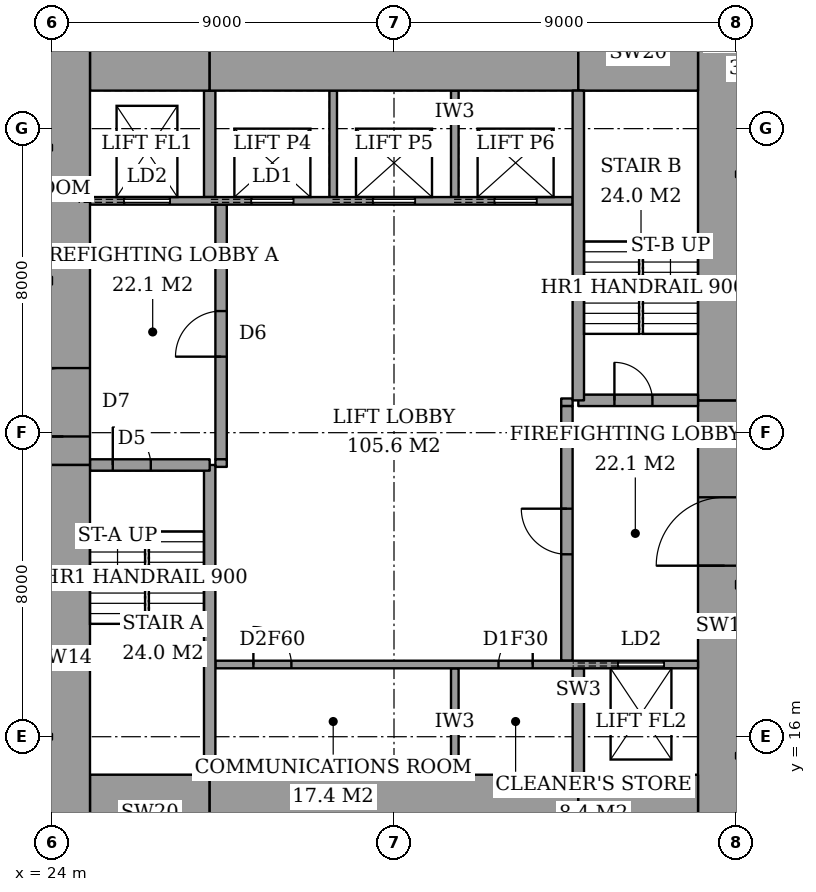
"""IFC4 building model, lengths in metres.
Left out: names, types, materials, properties, quantities, classifications, styles, units other than length and angle.
Written with IfcOpenShell. Run it as: python <this file> out.ifc"""

import sys

from ifc_helpers import new_model, si_unit, direction, frame, frame_2d, origin, place, context, subcontext, project, spatial, rectangle, extrude, element, fill, save


model = new_model("IFC4")
c1 = context("Model", 3, precision=1e-05, world=origin(), true_north=direction((0.0, 1.0)))
c2 = subcontext(c1, "Body", "Model", "MODEL_VIEW")
j1 = project(units=[si_unit("LENGTHUNIT", "METRE"), si_unit("PLANEANGLEUNIT", "RADIAN")], contexts=[c1])
p1 = place(None, origin())
s1 = spatial("IfcSite", under=j1, at=p1, CompositionType="ELEMENT")
p2 = place(p1, origin())
s2 = spatial("IfcBuilding", under=s1, at=p2, CompositionType="ELEMENT")
p3 = place(p2, frame((0.0, 0.0, 203.8)))
s3 = spatial("IfcBuildingStorey", under=s2, at=p3, CompositionType="ELEMENT", Elevation=203.8)
p4 = place(p3, frame((25.0, 14.0, 0.0), z_axis=(0.0, 0.0, 1.0), x_axis=(1.0, 0.0, 0.0)))
e1 = element("IfcWall", 1, at=p4, inside=s3, PredefinedType="SHEAR", context=c2, shape_type="SweptSolid", body=[
    extrude(rectangle(XDim=3.15, YDim=2.0, at=frame_2d((1.575, 0.0))), origin(), (0.0, 0.0, 1.0), 3.6),
])
p5 = place(p3, frame((28.15, 14.0, 0.0), z_axis=(0.0, 0.0, 1.0), x_axis=(1.0, 0.0, 0.0)))
e2 = element("IfcWall", 2, at=p5, inside=s3, PredefinedType="SHEAR", context=c2, shape_type="SweptSolid", body=[
    extrude(rectangle(XDim=9.7, YDim=2.0, at=frame_2d((4.85, 0.0))), origin(), (0.0, 0.0, 1.0), 3.6),
])
for number, where, z_axis, x_axis in (
    (3, (37.85, 14.0, 0.0), (0.0, 0.0, 1.0), (1.0, 0.0, 0.0)),
    (4, (25.0, 34.0, 0.0), (0.0, 0.0, 1.0), (1.0, 0.0, 0.0)),
):
    element("IfcWall", number, at=place(p3, frame(where, z_axis=z_axis, x_axis=x_axis)), inside=s3, PredefinedType="SHEAR", context=c2, shape_type="SweptSolid", body=[
        extrude(rectangle(XDim=3.15, YDim=2.0, at=frame_2d((1.575, 0.0))), origin(), (0.0, 0.0, 1.0), 3.6),
    ])
p6 = place(p3, frame((28.15, 34.0, 0.0), z_axis=(0.0, 0.0, 1.0), x_axis=(1.0, 0.0, 0.0)))
e5 = element("IfcWall", 5, at=p6, inside=s3, PredefinedType="SHEAR", context=c2, shape_type="SweptSolid", body=[
    extrude(rectangle(XDim=9.7, YDim=2.0, at=frame_2d((4.85, 0.0))), origin(), (0.0, 0.0, 1.0), 3.6),
])
p7 = place(p3, frame((37.85, 34.0, 0.0), z_axis=(0.0, 0.0, 1.0), x_axis=(1.0, 0.0, 0.0)))
e6 = element("IfcWall", 6, at=p7, inside=s3, PredefinedType="SHEAR", context=c2, shape_type="SweptSolid", body=[
    extrude(rectangle(XDim=3.15, YDim=2.0, at=frame_2d((1.575, 0.0))), origin(), (0.0, 0.0, 1.0), 3.6),
])
p8 = place(p3, frame((24.3, 13.0, 0.0), z_axis=(0.0, 0.0, 1.0), x_axis=(0.0, 1.0, 0.0)))
e7 = element("IfcWall", 7, at=p8, inside=s3, PredefinedType="SHEAR", context=c2, shape_type="SweptSolid", body=[
    extrude(rectangle(XDim=10.15, YDim=1.4, at=frame_2d((5.075, 0.0))), origin(), (0.0, 0.0, 1.0), 3.6),
])
p9 = place(p3, frame((24.3, 23.15, 0.0), z_axis=(0.0, 0.0, 1.0), x_axis=(0.0, 1.0, 0.0)))
e8 = element("IfcWall", 8, at=p9, inside=s3, PredefinedType="SHEAR", context=c2, shape_type="SweptSolid", body=[
    extrude(rectangle(XDim=11.85, YDim=1.4, at=frame_2d((5.925, 0.0))), origin(), (0.0, 0.0, 1.0), 3.6),
])
p10 = place(p9, frame((0.75, 0.0, 0.0)))
e9 = element("IfcOpeningElement", 9, at=p10, cuts=e8, PredefinedType="OPENING", context=c2, shape_type="SweptSolid", body=[
    extrude(rectangle(XDim=1.8, YDim=2.4, at=frame_2d((0.9, 1.2))), frame((0.0, 0.71, 0.0), z_axis=(0.0, -1.0, 0.0), x_axis=(1.0, 0.0, 0.0)), (0.0, 0.0, 1.0), 1.42),
])
p11 = place(p3, frame((41.7, 13.0, 0.0), z_axis=(0.0, 0.0, 1.0), x_axis=(0.0, 1.0, 0.0)))
e10 = element("IfcWall", 10, at=p11, inside=s3, PredefinedType="SHEAR", context=c2, shape_type="SweptSolid", body=[
    extrude(rectangle(XDim=11.85, YDim=1.4, at=frame_2d((5.925, 0.0))), origin(), (0.0, 0.0, 1.0), 3.6),
])
p12 = place(p11, frame((7.5, 0.0, 0.0)))
e11 = element("IfcOpeningElement", 11, at=p12, cuts=e10, PredefinedType="OPENING", context=c2, shape_type="SweptSolid", body=[
    extrude(rectangle(XDim=1.8, YDim=2.4, at=frame_2d((0.9, 1.2))), frame((0.0, 0.71, 0.0), z_axis=(0.0, -1.0, 0.0), x_axis=(1.0, 0.0, 0.0)), (0.0, 0.0, 1.0), 1.42),
])
p13 = place(p3, frame((41.7, 24.85, 0.0), z_axis=(0.0, 0.0, 1.0), x_axis=(0.0, 1.0, 0.0)))
e12 = element("IfcWall", 12, at=p13, inside=s3, PredefinedType="SHEAR", context=c2, shape_type="SweptSolid", body=[
    extrude(rectangle(XDim=10.15, YDim=1.4, at=frame_2d((5.075, 0.0))), origin(), (0.0, 0.0, 1.0), 3.6),
])
p14 = place(p3, frame((28.15, 15.0, 0.0), z_axis=(0.0, 0.0, 1.0), x_axis=(0.0, 1.0, 0.0)))
e13 = element("IfcWall", 13, at=p14, inside=s3, PredefinedType="SHEAR", context=c2, shape_type="SweptSolid", body=[
    extrude(rectangle(XDim=8.15, YDim=0.3, at=frame_2d((4.075, 0.0))), origin(), (0.0, 0.0, 1.0), 3.6),
])
p15 = place(p3, frame((25.0, 23.15, 0.0), z_axis=(0.0, 0.0, 1.0), x_axis=(1.0, 0.0, 0.0)))
e14 = element("IfcWall", 14, at=p15, inside=s3, PredefinedType="SHEAR", context=c2, shape_type="SweptSolid", body=[
    extrude(rectangle(XDim=3.15, YDim=0.3, at=frame_2d((1.575, 0.0))), origin(), (0.0, 0.0, 1.0), 3.6),
])
p16 = place(p15, frame((0.6, 0.0, 0.0)))
e15 = element("IfcOpeningElement", 15, at=p16, cuts=e14, PredefinedType="OPENING", context=c2, shape_type="SweptSolid", body=[
    extrude(rectangle(XDim=1.0, YDim=2.1, at=frame_2d((0.5, 1.05))), frame((0.0, 0.16, 0.0), z_axis=(0.0, -1.0, 0.0), x_axis=(1.0, 0.0, 0.0)), (0.0, 0.0, 1.0), 0.32),
])
p17 = place(p3, frame((37.85, 24.85, 0.0), z_axis=(0.0, 0.0, 1.0), x_axis=(0.0, 1.0, 0.0)))
e16 = element("IfcWall", 16, at=p17, inside=s3, PredefinedType="SHEAR", context=c2, shape_type="SweptSolid", body=[
    extrude(rectangle(XDim=8.15, YDim=0.3, at=frame_2d((4.075, 0.0))), origin(), (0.0, 0.0, 1.0), 3.6),
])
p18 = place(p3, frame((37.85, 24.85, 0.0), z_axis=(0.0, 0.0, 1.0), x_axis=(1.0, 0.0, 0.0)))
e17 = element("IfcWall", 17, at=p18, inside=s3, PredefinedType="SHEAR", context=c2, shape_type="SweptSolid", body=[
    extrude(rectangle(XDim=3.15, YDim=0.3, at=frame_2d((1.575, 0.0))), origin(), (0.0, 0.0, 1.0), 3.6),
])
p19 = place(p18, frame((0.95, 0.0, 0.0)))
e18 = element("IfcOpeningElement", 18, at=p19, cuts=e17, PredefinedType="OPENING", context=c2, shape_type="SweptSolid", body=[
    extrude(rectangle(XDim=1.0, YDim=2.1, at=frame_2d((0.5, 1.05))), frame((0.0, 0.16, 0.0), z_axis=(0.0, -1.0, 0.0), x_axis=(1.0, 0.0, 0.0)), (0.0, 0.0, 1.0), 0.32),
])
p20 = place(p3, frame((28.45, 23.3, 0.0), z_axis=(0.0, 0.0, 1.0), x_axis=(0.0, 1.0, 0.0)))
e19 = element("IfcWall", 19, at=p20, inside=s3, PredefinedType="PARTITIONING", context=c2, shape_type="SweptSolid", body=[
    extrude(rectangle(XDim=6.7, YDim=0.3, at=frame_2d((3.35, 0.0))), origin(), (0.0, 0.0, 1.0), 3.6),
])
p21 = place(p20, frame((2.7, 0.0, 0.0)))
e20 = element("IfcOpeningElement", 20, at=p21, cuts=e19, PredefinedType="OPENING", context=c2, shape_type="SweptSolid", body=[
    extrude(rectangle(XDim=1.2, YDim=2.1, at=frame_2d((0.6, 1.05))), frame((0.0, 0.16, 0.0), z_axis=(0.0, -1.0, 0.0), x_axis=(1.0, 0.0, 0.0)), (0.0, 0.0, 1.0), 0.32),
])
p22 = place(p3, frame((37.55, 18.0, 0.0), z_axis=(0.0, 0.0, 1.0), x_axis=(0.0, 1.0, 0.0)))
e21 = element("IfcWall", 21, at=p22, inside=s3, PredefinedType="PARTITIONING", context=c2, shape_type="SweptSolid", body=[
    extrude(rectangle(XDim=6.7, YDim=0.3, at=frame_2d((3.35, 0.0))), origin(), (0.0, 0.0, 1.0), 3.6),
])
p23 = place(p22, frame((2.8, 0.0, 0.0)))
e22 = element("IfcOpeningElement", 22, at=p23, cuts=e21, PredefinedType="OPENING", context=c2, shape_type="SweptSolid", body=[
    extrude(rectangle(XDim=1.2, YDim=2.1, at=frame_2d((0.6, 1.05))), frame((0.0, 0.16, 0.0), z_axis=(0.0, -1.0, 0.0), x_axis=(1.0, 0.0, 0.0)), (0.0, 0.0, 1.0), 0.32),
])
p24 = place(p3, frame((28.3, 17.9, 0.0), z_axis=(0.0, 0.0, 1.0), x_axis=(1.0, 0.0, 0.0)))
e23 = element("IfcWall", 23, at=p24, inside=s3, PredefinedType="PARTITIONING", context=c2, shape_type="SweptSolid", body=[
    extrude(rectangle(XDim=12.7, YDim=0.2, at=frame_2d((6.35, 0.0))), origin(), (0.0, 0.0, 1.0), 3.6),
])
p25 = place(p24, frame((1.0, 0.0, 0.0)))
e24 = element("IfcOpeningElement", 24, at=p25, cuts=e23, PredefinedType="OPENING", context=c2, shape_type="SweptSolid", body=[
    extrude(rectangle(XDim=1.0, YDim=2.1, at=frame_2d((0.5, 1.05))), frame((0.0, 0.11, 0.0), z_axis=(0.0, -1.0, 0.0), x_axis=(1.0, 0.0, 0.0)), (0.0, 0.0, 1.0), 0.22),
])
p26 = place(p24, frame((7.45, 0.0, 0.0)))
e25 = element("IfcOpeningElement", 25, at=p26, cuts=e23, PredefinedType="OPENING", context=c2, shape_type="SweptSolid", body=[
    extrude(rectangle(XDim=0.9, YDim=2.1, at=frame_2d((0.45, 1.05))), frame((0.0, 0.11, 0.0), z_axis=(0.0, -1.0, 0.0), x_axis=(1.0, 0.0, 0.0)), (0.0, 0.0, 1.0), 0.22),
])
p27 = place(p24, frame((10.6, 0.0, 0.0)))
e26 = element("IfcOpeningElement", 26, at=p27, cuts=e23, PredefinedType="OPENING", context=c2, shape_type="SweptSolid", body=[
    extrude(rectangle(XDim=1.2, YDim=2.1, at=frame_2d((0.6, 1.05))), frame((0.0, 0.11, 0.0), z_axis=(0.0, -1.0, 0.0), x_axis=(1.0, 0.0, 0.0)), (0.0, 0.0, 1.0), 0.22),
])
p28 = place(p3, frame((25.0, 30.1, 0.0), z_axis=(0.0, 0.0, 1.0), x_axis=(1.0, 0.0, 0.0)))
e27 = element("IfcWall", 27, at=p28, inside=s3, PredefinedType="PARTITIONING", context=c2, shape_type="SweptSolid", body=[
    extrude(rectangle(XDim=12.7, YDim=0.2, at=frame_2d((6.35, 0.0))), origin(), (0.0, 0.0, 1.0), 3.6),
])
p29 = place(p28, frame((4.25, 0.0, 0.0)))
e28 = element("IfcOpeningElement", 28, at=p29, cuts=e27, PredefinedType="OPENING", context=c2, shape_type="SweptSolid", body=[
    extrude(rectangle(XDim=1.1, YDim=2.1, at=frame_2d((0.55, 1.05))), frame((0.0, 0.11, 0.0), z_axis=(0.0, -1.0, 0.0), x_axis=(1.0, 0.0, 0.0)), (0.0, 0.0, 1.0), 0.22),
])
p30 = place(p28, frame((7.45, 0.0, 0.0)))
e29 = element("IfcOpeningElement", 29, at=p30, cuts=e27, PredefinedType="OPENING", context=c2, shape_type="SweptSolid", body=[
    extrude(rectangle(XDim=1.1, YDim=2.1, at=frame_2d((0.55, 1.05))), frame((0.0, 0.11, 0.0), z_axis=(0.0, -1.0, 0.0), x_axis=(1.0, 0.0, 0.0)), (0.0, 0.0, 1.0), 0.22),
])
p31 = place(p28, frame((10.65, 0.0, 0.0)))
e30 = element("IfcOpeningElement", 30, at=p31, cuts=e27, PredefinedType="OPENING", context=c2, shape_type="SweptSolid", body=[
    extrude(rectangle(XDim=1.1, YDim=2.1, at=frame_2d((0.55, 1.05))), frame((0.0, 0.11, 0.0), z_axis=(0.0, -1.0, 0.0), x_axis=(1.0, 0.0, 0.0)), (0.0, 0.0, 1.0), 0.22),
])
p32 = place(p28, frame((0.9, 0.0, 0.0)))
e31 = element("IfcOpeningElement", 31, at=p32, cuts=e27, PredefinedType="OPENING", context=c2, shape_type="SweptSolid", body=[
    extrude(rectangle(XDim=1.2, YDim=2.1, at=frame_2d((0.6, 1.05))), frame((0.0, 0.11, 0.0), z_axis=(0.0, -1.0, 0.0), x_axis=(1.0, 0.0, 0.0)), (0.0, 0.0, 1.0), 0.22),
])
p33 = place(p3, frame((34.6, 15.0, 0.0), z_axis=(0.0, 0.0, 1.0), x_axis=(0.0, 1.0, 0.0)))
e32 = element("IfcWall", 32, at=p33, inside=s3, PredefinedType="PARTITIONING", context=c2, shape_type="SweptSolid", body=[
    extrude(rectangle(XDim=2.8, YDim=0.2, at=frame_2d((1.4, 0.0))), origin(), (0.0, 0.0, 1.0), 3.6),
])
p34 = place(p3, frame((37.85, 15.0, 0.0), z_axis=(0.0, 0.0, 1.0), x_axis=(0.0, 1.0, 0.0)))
e33 = element("IfcWall", 33, at=p34, inside=s3, PredefinedType="SHEAR", context=c2, shape_type="SweptSolid", body=[
    extrude(rectangle(XDim=2.8, YDim=0.3, at=frame_2d((1.4, 0.0))), origin(), (0.0, 0.0, 1.0), 3.6),
])
for number, where, z_axis, x_axis in (
    (34, (31.4, 30.2, 0.0), (0.0, 0.0, 1.0), (0.0, 1.0, 0.0)),
    (35, (34.6, 30.2, 0.0), (0.0, 0.0, 1.0), (0.0, 1.0, 0.0)),
):
    element("IfcWall", number, at=place(p3, frame(where, z_axis=z_axis, x_axis=x_axis)), inside=s3, PredefinedType="PARTITIONING", context=c2, shape_type="SweptSolid", body=[
        extrude(rectangle(XDim=2.8, YDim=0.2, at=frame_2d((1.4, 0.0))), origin(), (0.0, 0.0, 1.0), 3.6),
    ])
p35 = place(p3, frame((28.15, 30.2, 0.0), z_axis=(0.0, 0.0, 1.0), x_axis=(0.0, 1.0, 0.0)))
e36 = element("IfcWall", 36, at=p35, inside=s3, PredefinedType="SHEAR", context=c2, shape_type="SweptSolid", body=[
    extrude(rectangle(XDim=2.8, YDim=0.3, at=frame_2d((1.4, 0.0))), origin(), (0.0, 0.0, 1.0), 3.6),
])
for number, where, z_axis, x_axis in (
    (37, (28.3, 23.2, 0.0), (0.0, 0.0, 1.0), (1.0, 0.0, 0.0)),
    (38, (37.4, 24.8, 0.0), (0.0, 0.0, 1.0), (1.0, 0.0, 0.0)),
):
    element("IfcWall", number, at=place(p3, frame(where, z_axis=z_axis, x_axis=x_axis)), inside=s3, PredefinedType="PARTITIONING", context=c2, shape_type="SweptSolid", body=[
        extrude(rectangle(XDim=0.3, YDim=0.2, at=frame_2d((0.15, 0.0))), origin(), (0.0, 0.0, 1.0), 3.6),
    ])
p36 = place(p16, origin())
e39 = element("IfcDoor", 39, at=p36, inside=s3, OperationType="SINGLE_SWING_RIGHT", PredefinedType="DOOR", context=c2, shape_type="SweptSolid", body=[
    extrude(rectangle(XDim=1.0, YDim=2.1, at=frame_2d((0.5, 1.05))), frame((0.0, 0.025, 0.0), z_axis=(0.0, -1.0, 0.0), x_axis=(1.0, 0.0, 0.0)), (0.0, 0.0, 1.0), 0.05),
])
fill(e15, e39)
p37 = place(p19, origin())
e40 = element("IfcDoor", 40, at=p37, inside=s3, OperationType="SINGLE_SWING_RIGHT", PredefinedType="DOOR", context=c2, shape_type="SweptSolid", body=[
    extrude(rectangle(XDim=1.0, YDim=2.1, at=frame_2d((0.5, 1.05))), frame((0.0, 0.025, 0.0), z_axis=(0.0, -1.0, 0.0), x_axis=(1.0, 0.0, 0.0)), (0.0, 0.0, 1.0), 0.05),
])
fill(e18, e40)
p38 = place(p21, origin())
e41 = element("IfcDoor", 41, at=p38, inside=s3, OperationType="SINGLE_SWING_RIGHT", PredefinedType="DOOR", context=c2, shape_type="SweptSolid", body=[
    extrude(rectangle(XDim=1.2, YDim=2.1, at=frame_2d((0.6, 1.05))), frame((0.0, 0.025, 0.0), z_axis=(0.0, -1.0, 0.0), x_axis=(1.0, 0.0, 0.0)), (0.0, 0.0, 1.0), 0.05),
])
fill(e20, e41)
p39 = place(p23, origin())
e42 = element("IfcDoor", 42, at=p39, inside=s3, OperationType="SINGLE_SWING_LEFT", PredefinedType="DOOR", context=c2, shape_type="SweptSolid", body=[
    extrude(rectangle(XDim=1.2, YDim=2.1, at=frame_2d((0.6, 1.05))), frame((0.0, 0.025, 0.0), z_axis=(0.0, -1.0, 0.0), x_axis=(1.0, 0.0, 0.0)), (0.0, 0.0, 1.0), 0.05),
])
fill(e22, e42)
p40 = place(p10, origin())
e43 = element("IfcDoor", 43, at=p40, inside=s3, OperationType="DOUBLE_DOOR_DOUBLE_SWING", PredefinedType="DOOR", context=c2, shape_type="SweptSolid", body=[
    extrude(rectangle(XDim=1.8, YDim=2.4, at=frame_2d((0.9, 1.2))), frame((0.0, 0.025, 0.0), z_axis=(0.0, -1.0, 0.0), x_axis=(1.0, 0.0, 0.0)), (0.0, 0.0, 1.0), 0.05),
])
fill(e9, e43)
p41 = place(p12, origin())
e44 = element("IfcDoor", 44, at=p41, inside=s3, OperationType="DOUBLE_DOOR_DOUBLE_SWING", PredefinedType="DOOR", context=c2, shape_type="SweptSolid", body=[
    extrude(rectangle(XDim=1.8, YDim=2.4, at=frame_2d((0.9, 1.2))), frame((0.0, 0.025, 0.0), z_axis=(0.0, -1.0, 0.0), x_axis=(1.0, 0.0, 0.0)), (0.0, 0.0, 1.0), 0.05),
])
fill(e11, e44)
p42 = place(p25, origin())
e45 = element("IfcDoor", 45, at=p42, inside=s3, OperationType="SINGLE_SWING_RIGHT", PredefinedType="DOOR", context=c2, shape_type="SweptSolid", body=[
    extrude(rectangle(XDim=1.0, YDim=2.1, at=frame_2d((0.5, 1.05))), frame((0.0, 0.025, 0.0), z_axis=(0.0, -1.0, 0.0), x_axis=(1.0, 0.0, 0.0)), (0.0, 0.0, 1.0), 0.05),
])
fill(e24, e45)
p43 = place(p26, origin())
e46 = element("IfcDoor", 46, at=p43, inside=s3, OperationType="SINGLE_SWING_LEFT", PredefinedType="DOOR", context=c2, shape_type="SweptSolid", body=[
    extrude(rectangle(XDim=0.9, YDim=2.1, at=frame_2d((0.45, 1.05))), frame((0.0, 0.025, 0.0), z_axis=(0.0, -1.0, 0.0), x_axis=(1.0, 0.0, 0.0)), (0.0, 0.0, 1.0), 0.05),
])
fill(e25, e46)
p44 = place(p29, origin())
e47 = element("IfcDoor", 47, at=p44, inside=s3, OperationType="SLIDING_TO_LEFT", PredefinedType="DOOR", context=c2, shape_type="SweptSolid", body=[
    extrude(rectangle(XDim=1.1, YDim=2.1, at=frame_2d((0.55, 1.05))), frame((0.0, 0.025, 0.0), z_axis=(0.0, -1.0, 0.0), x_axis=(1.0, 0.0, 0.0)), (0.0, 0.0, 1.0), 0.05),
])
fill(e28, e47)
p45 = place(p30, origin())
e48 = element("IfcDoor", 48, at=p45, inside=s3, OperationType="SLIDING_TO_LEFT", PredefinedType="DOOR", context=c2, shape_type="SweptSolid", body=[
    extrude(rectangle(XDim=1.1, YDim=2.1, at=frame_2d((0.55, 1.05))), frame((0.0, 0.025, 0.0), z_axis=(0.0, -1.0, 0.0), x_axis=(1.0, 0.0, 0.0)), (0.0, 0.0, 1.0), 0.05),
])
fill(e29, e48)
p46 = place(p31, origin())
e49 = element("IfcDoor", 49, at=p46, inside=s3, OperationType="SLIDING_TO_LEFT", PredefinedType="DOOR", context=c2, shape_type="SweptSolid", body=[
    extrude(rectangle(XDim=1.1, YDim=2.1, at=frame_2d((0.55, 1.05))), frame((0.0, 0.025, 0.0), z_axis=(0.0, -1.0, 0.0), x_axis=(1.0, 0.0, 0.0)), (0.0, 0.0, 1.0), 0.05),
])
fill(e30, e49)
p47 = place(p32, origin())
e50 = element("IfcDoor", 50, at=p47, inside=s3, OperationType="SLIDING_TO_LEFT", PredefinedType="DOOR", context=c2, shape_type="SweptSolid", body=[
    extrude(rectangle(XDim=1.2, YDim=2.1, at=frame_2d((0.6, 1.05))), frame((0.0, 0.025, 0.0), z_axis=(0.0, -1.0, 0.0), x_axis=(1.0, 0.0, 0.0)), (0.0, 0.0, 1.0), 0.05),
])
fill(e31, e50)
p48 = place(p27, origin())
e51 = element("IfcDoor", 51, at=p48, inside=s3, OperationType="SLIDING_TO_LEFT", PredefinedType="DOOR", context=c2, shape_type="SweptSolid", body=[
    extrude(rectangle(XDim=1.2, YDim=2.1, at=frame_2d((0.6, 1.05))), frame((0.0, 0.025, 0.0), z_axis=(0.0, -1.0, 0.0), x_axis=(1.0, 0.0, 0.0)), (0.0, 0.0, 1.0), 0.05),
])
fill(e26, e51)
save(model, sys.argv[1])
